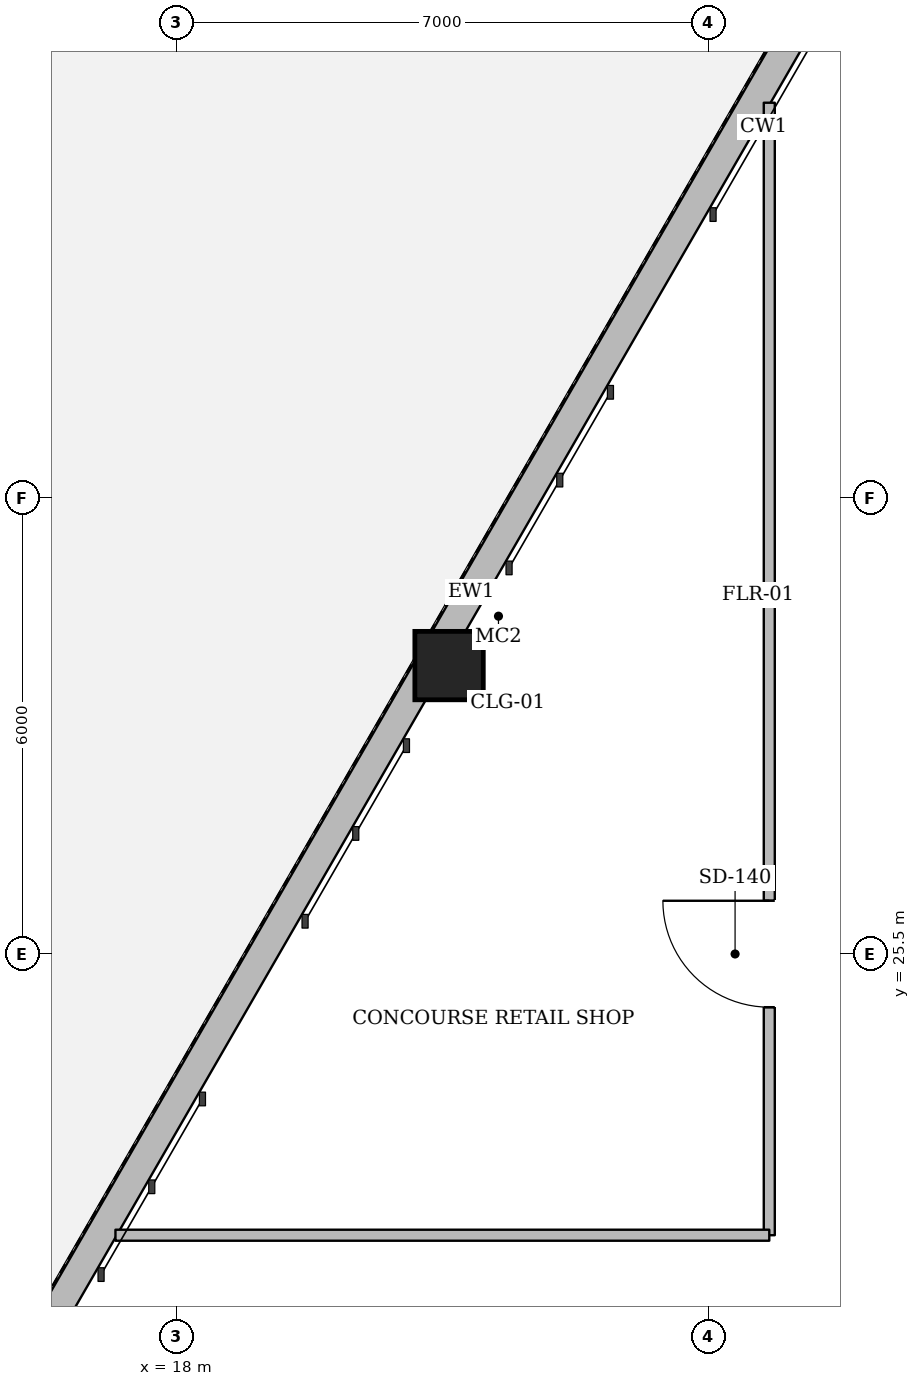
"""IFC4 building model, lengths in metres.
Left out: names, types, materials, properties, quantities, classifications, styles, units other than length and angle.
Written with IfcOpenShell. Run it as: python <this file> out.ifc"""

import sys

from ifc_helpers import new_model, si_unit, direction, frame, frame_2d, origin, origin_2d, place, context, subcontext, project, spatial, rectangle, hollow_rectangle, extrude, element, fill, save


model = new_model("IFC4")
c1 = context("Model", 3, precision=1e-05, world=origin(), true_north=direction((0.0, 1.0)))
c2 = subcontext(c1, "Body", "Model", "MODEL_VIEW")
j1 = project(units=[si_unit("LENGTHUNIT", "METRE"), si_unit("PLANEANGLEUNIT", "RADIAN")], contexts=[c1])
p1 = place(None, origin())
s1 = spatial("IfcSite", under=j1, at=p1, CompositionType="ELEMENT")
p2 = place(p1, origin())
s2 = spatial("IfcBuilding", under=s1, at=p2, CompositionType="ELEMENT")
p3 = place(p2, origin())
s3 = spatial("IfcBuildingStorey", under=s2, at=p3, CompositionType="ELEMENT", Elevation=0.0)
p4 = place(p3, frame((21.587, 29.294, 0.0), z_axis=(0.0, 0.0, 1.0), x_axis=(1.0, 0.0, 0.0)))
e1 = element("IfcColumn", 1, at=p4, inside=s3, PredefinedType="COLUMN", context=c2, shape_type="SweptSolid", body=[
    extrude(hollow_rectangle(XDim=0.9, YDim=0.9, WallThickness=0.038, at=origin_2d()), origin(), (0.0, 0.0, 1.0), 5.74),
])
p5 = place(p3, frame((13.177, 15.186, 0.0), z_axis=(0.0, 0.0, 1.0), x_axis=(0.500000109808, 0.866025340387, 0.0)))
e2 = element("IfcWall", 2, at=p5, inside=s3, PredefinedType="STANDARD", context=c2, shape_type="SweptSolid", body=[
    extrude(rectangle(XDim=33.16, YDim=0.38, at=frame_2d((16.58, 0.0))), origin(), (0.0, 0.0, 1.0), 3.43),
])
p6 = place(p5, frame((4.307, 0.0, 0.0)))
e3 = element("IfcOpeningElement", 3, at=p6, cuts=e2, PredefinedType="OPENING", context=c2, shape_type="SweptSolid", body=[
    extrude(rectangle(XDim=1.8, YDim=2.25, at=frame_2d((0.9, 1.125))), frame((0.0, 0.2, 0.0), z_axis=(0.0, -1.0, 0.0), x_axis=(1.0, 0.0, 0.0)), (0.0, 0.0, 1.0), 0.4),
])
p7 = place(p5, frame((28.699, 0.0, 0.55)))
e4 = element("IfcOpeningElement", 4, at=p7, cuts=e2, PredefinedType="OPENING", context=c2, shape_type="SweptSolid", body=[
    extrude(rectangle(XDim=2.6, YDim=2.55, at=frame_2d((1.3, 1.275))), frame((0.0, 0.2, 0.0), z_axis=(0.0, -1.0, 0.0), x_axis=(1.0, 0.0, 0.0)), (0.0, 0.0, 1.0), 0.4),
])
p8 = place(p3, frame((25.8, 21.8, 0.0), z_axis=(0.0, 0.0, 1.0), x_axis=(0.0, 1.0, 0.0)))
e5 = element("IfcWall", 5, at=p8, inside=s3, PredefinedType="PARTITIONING", context=c2, shape_type="SweptSolid", body=[
    extrude(rectangle(XDim=14.899, YDim=0.145, at=frame_2d((7.449, 0.0))), origin(), (0.0, 0.0, 1.0), 3.435),
])
p9 = place(p8, frame((3.0, 0.0, 0.0)))
e6 = element("IfcOpeningElement", 6, at=p9, cuts=e5, PredefinedType="OPENING", context=c2, shape_type="SweptSolid", body=[
    extrude(rectangle(XDim=1.4, YDim=2.2, at=frame_2d((0.7, 1.1))), frame((0.0, 0.083, 0.0), z_axis=(0.0, -1.0, 0.0), x_axis=(1.0, 0.0, 0.0)), (0.0, 0.0, 1.0), 0.165),
])
p10 = place(p3, frame((17.198, 21.8, 0.0), z_axis=(0.0, 0.0, 1.0), x_axis=(1.0, 0.0, 0.0)))
e7 = element("IfcWall", 7, at=p10, inside=s3, PredefinedType="PARTITIONING", context=c2, shape_type="SweptSolid", body=[
    extrude(rectangle(XDim=8.602, YDim=0.145, at=frame_2d((4.301, 0.0))), origin(), (0.0, 0.0, 1.0), 5.74),
])
p11 = place(p9, origin())
e8 = element("IfcDoor", 8, at=p11, inside=s3, OperationType="SINGLE_SWING_RIGHT", PredefinedType="DOOR", context=c2, shape_type="SweptSolid", body=[
    extrude(rectangle(XDim=1.4, YDim=2.2, at=frame_2d((0.7, 1.1))), frame((0.0, 0.025, 0.0), z_axis=(0.0, -1.0, 0.0), x_axis=(1.0, 0.0, 0.0)), (0.0, 0.0, 1.0), 0.05),
])
fill(e6, e8)
save(model, sys.argv[1])
